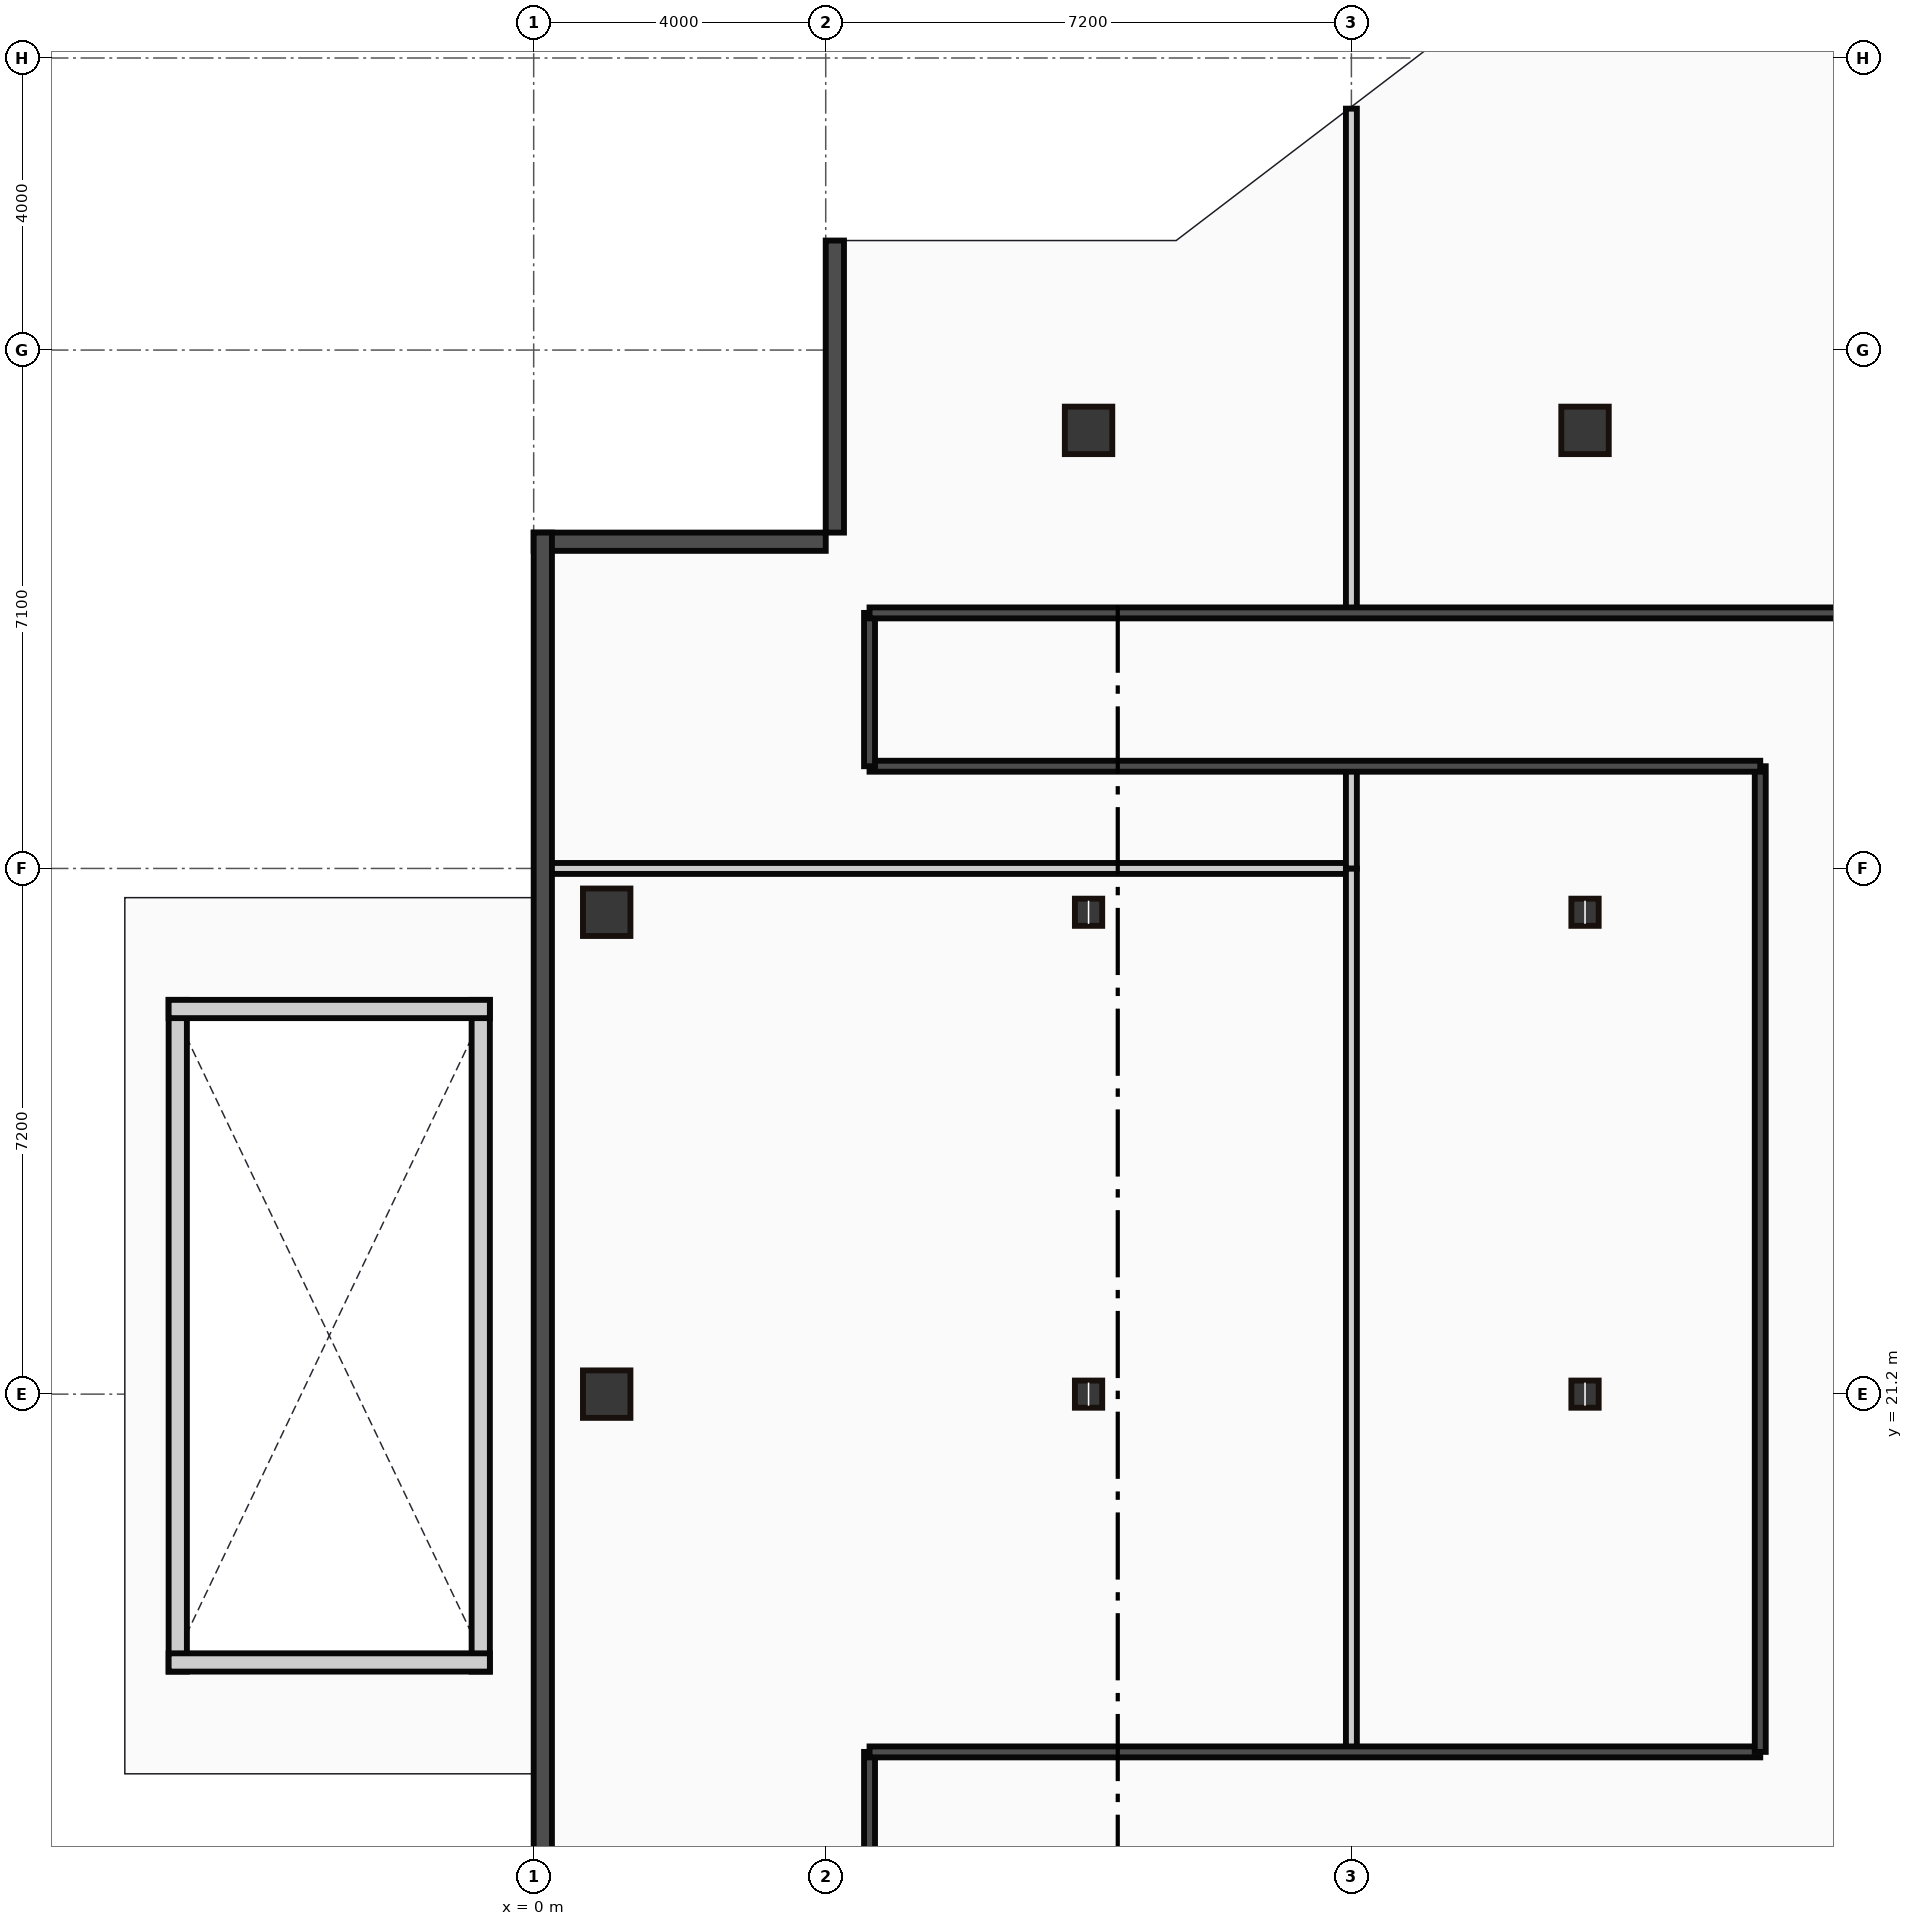
"""IFC4 building model, lengths in metres.
Left out: names, types, materials, properties, quantities, classifications, styles, units other than length and angle.
Written with IfcOpenShell. Run it as: python <this file> out.ifc"""

import sys

from ifc_helpers import new_model, si_unit, direction, frame, frame_2d, origin, origin_2d, place, context, subcontext, project, spatial, rectangle, hollow_rectangle, i_section, extrude, source, transform, mapped, element, fill, save


model = new_model("IFC4")
c1 = context("Model", 3, precision=1e-05, world=origin(), true_north=direction((0.0, 1.0)))
c2 = subcontext(c1, "Body", "Model", "MODEL_VIEW")
j1 = project(units=[si_unit("LENGTHUNIT", "METRE"), si_unit("PLANEANGLEUNIT", "RADIAN")], contexts=[c1])
p1 = place(None, origin())
s1 = spatial("IfcSite", under=j1, at=p1, CompositionType="ELEMENT")
p2 = place(p1, origin())
s2 = spatial("IfcBuilding", under=s1, at=p2, CompositionType="ELEMENT")
p3 = place(p2, frame((0.0, 0.0, 184.4)))
s3 = spatial("IfcBuildingStorey", under=s2, at=p3, CompositionType="ELEMENT", Elevation=184.4)
m1 = source(origin(), c2, "Body", "SweptSolid", [
    extrude(hollow_rectangle(XDim=0.65, YDim=0.65, WallThickness=0.032, at=origin_2d()), origin(), (0.0, 0.0, 1.0), 4.2),
])
for number, where, z_axis, x_axis in (
    (1, (1.0, 21.2, 0.0), (0.0, 0.0, 1.0), (1.0, 0.0, 0.0)),
    (2, (1.0, 27.8, 0.0), (0.0, 0.0, 1.0), (1.0, 0.0, 0.0)),
):
    element("IfcColumn", number, at=place(p3, frame(where, z_axis=z_axis, x_axis=x_axis)), inside=s3, PredefinedType="COLUMN", context=c2, shape_type="MappedRepresentation", body=[
        mapped(m1, transform((0.0, 0.0, 0.0))),
    ])
m2 = source(origin(), c2, "Body", "SweptSolid", [
    extrude(i_section(OverallWidth=0.374, OverallDepth=0.372, WebThickness=0.016, FlangeThickness=0.026, at=origin_2d()), origin(), (0.0, 0.0, 1.0), 4.2),
])
for number, where, z_axis, x_axis in (
    (3, (7.6, 21.2, 0.0), (0.0, 0.0, 1.0), (1.0, 0.0, 0.0)),
    (4, (7.6, 27.8, 0.0), (0.0, 0.0, 1.0), (1.0, 0.0, 0.0)),
):
    element("IfcColumn", number, at=place(p3, frame(where, z_axis=z_axis, x_axis=x_axis)), inside=s3, PredefinedType="COLUMN", context=c2, shape_type="MappedRepresentation", body=[
        mapped(m2, transform((0.0, 0.0, 0.0))),
    ])
p4 = place(p3, frame((7.6, 34.4, 0.0), z_axis=(0.0, 0.0, 1.0), x_axis=(1.0, 0.0, 0.0)))
e5 = element("IfcColumn", 5, at=p4, inside=s3, PredefinedType="COLUMN", context=c2, shape_type="MappedRepresentation", body=[
    mapped(m1, transform((0.0, 0.0, 0.0))),
])
for number, where, z_axis, x_axis in (
    (6, (14.4, 21.2, 0.0), (0.0, 0.0, 1.0), (1.0, 0.0, 0.0)),
    (7, (14.4, 27.8, 0.0), (0.0, 0.0, 1.0), (1.0, 0.0, 0.0)),
):
    element("IfcColumn", number, at=place(p3, frame(where, z_axis=z_axis, x_axis=x_axis)), inside=s3, PredefinedType="COLUMN", context=c2, shape_type="MappedRepresentation", body=[
        mapped(m2, transform((0.0, 0.0, 0.0))),
    ])
p5 = place(p3, frame((14.4, 34.4, 0.0), z_axis=(0.0, 0.0, 1.0), x_axis=(1.0, 0.0, 0.0)))
e8 = element("IfcColumn", 8, at=p5, inside=s3, PredefinedType="COLUMN", context=c2, shape_type="MappedRepresentation", body=[
    mapped(m1, transform((0.0, 0.0, 0.0))),
])
m3 = source(origin(), c2, "Body", "SweptSolid", [
    extrude(rectangle(XDim=4.0, YDim=0.25, at=frame_2d((2.0, 0.0))), origin(), (0.0, 0.0, 1.0), 3.95),
])
for number, where, z_axis, x_axis in (
    (9, (4.125, 37.0, 0.0), (0.0, 0.0, 1.0), (0.0, -1.0, 0.0)),
    (10, (4.0, 32.875, 0.0), (0.0, 0.0, 1.0), (-1.0, 0.0, 0.0)),
):
    element("IfcWall", number, at=place(p3, frame(where, z_axis=z_axis, x_axis=x_axis)), inside=s3, PredefinedType="STANDARD", context=c2, shape_type="MappedRepresentation", body=[
        mapped(m3, transform((0.0, 0.0, 0.0))),
    ])
m4 = source(origin(), c2, "Body", "SweptSolid", [
    extrude(rectangle(XDim=29.0, YDim=0.25, at=frame_2d((14.5, 0.0))), origin(), (0.0, 0.0, 1.0), 3.95),
])
p6 = place(p3, frame((0.125, 33.0, 0.0), z_axis=(0.0, 0.0, 1.0), x_axis=(0.0, -1.0, 0.0)))
e11 = element("IfcWall", 11, at=p6, inside=s3, PredefinedType="STANDARD", context=c2, shape_type="MappedRepresentation", body=[
    mapped(m4, transform((0.0, 0.0, 0.0))),
])
p7 = place(p6, frame((8.0, 0.0, 0.0)))
e12 = element("IfcOpeningElement", 12, at=p7, cuts=e11, PredefinedType="OPENING", context=c2, shape_type="SweptSolid", body=[
    extrude(rectangle(XDim=1.8, YDim=2.2, at=frame_2d((0.9, 1.1))), frame((0.0, 0.135, 0.0), z_axis=(0.0, -1.0, 0.0), x_axis=(1.0, 0.0, 0.0)), (0.0, 0.0, 1.0), 0.27),
])
p8 = place(p6, frame((13.0, 0.0, 0.0)))
e13 = element("IfcOpeningElement", 13, at=p8, cuts=e11, PredefinedType="OPENING", context=c2, shape_type="SweptSolid", body=[
    extrude(rectangle(XDim=1.8, YDim=2.2, at=frame_2d((0.9, 1.1))), frame((0.0, 0.135, 0.0), z_axis=(0.0, -1.0, 0.0), x_axis=(1.0, 0.0, 0.0)), (0.0, 0.0, 1.0), 0.27),
])
p9 = place(p6, frame((0.9, 0.0, 0.85)))
e14 = element("IfcOpeningElement", 14, at=p9, cuts=e11, PredefinedType="OPENING", context=c2, shape_type="SweptSolid", body=[
    extrude(rectangle(XDim=1.8, YDim=2.2, at=frame_2d((0.9, 1.1))), frame((0.0, 0.135, 0.0), z_axis=(0.0, -1.0, 0.0), x_axis=(1.0, 0.0, 0.0)), (0.0, 0.0, 1.0), 0.27),
])
p10 = place(p6, frame((22.6, 0.0, 0.85)))
e15 = element("IfcOpeningElement", 15, at=p10, cuts=e11, PredefinedType="OPENING", context=c2, shape_type="SweptSolid", body=[
    extrude(rectangle(XDim=1.8, YDim=2.2, at=frame_2d((0.9, 1.1))), frame((0.0, 0.135, 0.0), z_axis=(0.0, -1.0, 0.0), x_axis=(1.0, 0.0, 0.0)), (0.0, 0.0, 1.0), 0.27),
])
m5 = source(origin(), c2, "Body", "SweptSolid", [
    extrude(rectangle(XDim=9.2, YDim=0.25, at=frame_2d((4.6, 0.0))), origin(), (0.0, 0.0, 1.0), 1.12),
])
for number, where, z_axis, x_axis in (
    (16, (-4.875, 17.4, -1.1), (0.0, 0.0, 1.0), (0.0, 1.0, 0.0)),
    (17, (-0.725, 17.4, -1.1), (0.0, 0.0, 1.0), (0.0, 1.0, 0.0)),
):
    element("IfcWall", number, at=place(p3, frame(where, z_axis=z_axis, x_axis=x_axis)), inside=s3, PredefinedType="PARAPET", context=c2, shape_type="MappedRepresentation", body=[
        mapped(m5, transform((0.0, 0.0, 0.0))),
    ])
m6 = source(origin(), c2, "Body", "SweptSolid", [
    extrude(rectangle(XDim=4.4, YDim=0.25, at=frame_2d((2.2, 0.0))), origin(), (0.0, 0.0, 1.0), 1.12),
])
for number, where, z_axis, x_axis in (
    (18, (-5.0, 17.525, -1.1), (0.0, 0.0, 1.0), (1.0, 0.0, 0.0)),
    (19, (-5.0, 26.475, -1.1), (0.0, 0.0, 1.0), (1.0, 0.0, 0.0)),
):
    element("IfcWall", number, at=place(p3, frame(where, z_axis=z_axis, x_axis=x_axis)), inside=s3, PredefinedType="PARAPET", context=c2, shape_type="MappedRepresentation", body=[
        mapped(m6, transform((0.0, 0.0, 0.0))),
    ])
m7 = source(origin(), c2, "Body", "SweptSolid", [
    extrude(rectangle(XDim=2.22, YDim=0.15, at=frame_2d((1.11, 0.0))), origin(), (0.0, 0.0, 1.0), 3.95),
])
p11 = place(p3, frame((4.6, 14.08, 0.0), z_axis=(0.0, 0.0, 1.0), x_axis=(0.0, 1.0, 0.0)))
e20 = element("IfcWall", 20, at=p11, inside=s3, PredefinedType="PARTITIONING", context=c2, shape_type="MappedRepresentation", body=[
    mapped(m7, transform((0.0, 0.0, 0.0))),
])
m8 = source(origin(), c2, "Body", "SweptSolid", [
    extrude(rectangle(XDim=12.2, YDim=0.15, at=frame_2d((6.1, 0.0))), origin(), (0.0, 0.0, 1.0), 3.95),
])
p12 = place(p3, frame((4.6, 16.3, 0.0), z_axis=(0.0, 0.0, 1.0), x_axis=(1.0, 0.0, 0.0)))
e21 = element("IfcWall", 21, at=p12, inside=s3, PredefinedType="PARTITIONING", context=c2, shape_type="MappedRepresentation", body=[
    mapped(m8, transform((0.0, 0.0, 0.0))),
])
p13 = place(p12, frame((2.955, 0.0, 0.0)))
e22 = element("IfcOpeningElement", 22, at=p13, cuts=e21, PredefinedType="OPENING", context=c2, shape_type="SweptSolid", body=[
    extrude(rectangle(XDim=0.95, YDim=2.15, at=frame_2d((0.475, 1.075))), frame((0.0, 0.085, 0.0), z_axis=(0.0, -1.0, 0.0), x_axis=(1.0, 0.0, 0.0)), (0.0, 0.0, 1.0), 0.17),
])
m9 = source(origin(), c2, "Body", "SweptSolid", [
    extrude(rectangle(XDim=13.5, YDim=0.15, at=frame_2d((6.75, 0.0))), origin(), (0.0, 0.0, 1.0), 3.95),
])
p14 = place(p3, frame((16.8, 16.3, 0.0), z_axis=(0.0, 0.0, 1.0), x_axis=(0.0, 1.0, 0.0)))
e23 = element("IfcWall", 23, at=p14, inside=s3, PredefinedType="PARTITIONING", context=c2, shape_type="MappedRepresentation", body=[
    mapped(m9, transform((0.0, 0.0, 0.0))),
])
p15 = place(p14, frame((6.275, 0.0, 0.0)))
e24 = element("IfcOpeningElement", 24, at=p15, cuts=e23, PredefinedType="OPENING", context=c2, shape_type="SweptSolid", body=[
    extrude(rectangle(XDim=0.95, YDim=2.15, at=frame_2d((0.475, 1.075))), frame((0.0, 0.085, 0.0), z_axis=(0.0, -1.0, 0.0), x_axis=(1.0, 0.0, 0.0)), (0.0, 0.0, 1.0), 0.17),
])
p16 = place(p3, frame((16.8, 29.8, 0.0), z_axis=(0.0, 0.0, 1.0), x_axis=(-1.0, 0.0, 0.0)))
e25 = element("IfcWall", 25, at=p16, inside=s3, PredefinedType="PARTITIONING", context=c2, shape_type="MappedRepresentation", body=[
    mapped(m8, transform((0.0, 0.0, 0.0))),
])
m10 = source(origin(), c2, "Body", "SweptSolid", [
    extrude(rectangle(XDim=2.1, YDim=0.15, at=frame_2d((1.05, 0.0))), origin(), (0.0, 0.0, 1.0), 3.95),
])
p17 = place(p3, frame((4.6, 29.8, 0.0), z_axis=(0.0, 0.0, 1.0), x_axis=(0.0, 1.0, 0.0)))
e26 = element("IfcWall", 26, at=p17, inside=s3, PredefinedType="PARTITIONING", context=c2, shape_type="MappedRepresentation", body=[
    mapped(m10, transform((0.0, 0.0, 0.0))),
])
m11 = source(origin(), c2, "Body", "SweptSolid", [
    extrude(rectangle(XDim=14.45, YDim=0.15, at=frame_2d((7.225, 0.0))), origin(), (0.0, 0.0, 1.0), 3.95),
])
p18 = place(p3, frame((4.6, 31.9, 0.0), z_axis=(0.0, 0.0, 1.0), x_axis=(1.0, 0.0, 0.0)))
e27 = element("IfcWall", 27, at=p18, inside=s3, PredefinedType="PARTITIONING", context=c2, shape_type="MappedRepresentation", body=[
    mapped(m11, transform((0.0, 0.0, 0.0))),
])
p19 = place(p18, frame((2.955, 0.0, 0.0)))
e28 = element("IfcOpeningElement", 28, at=p19, cuts=e27, PredefinedType="OPENING", context=c2, shape_type="SweptSolid", body=[
    extrude(rectangle(XDim=0.95, YDim=2.15, at=frame_2d((0.475, 1.075))), frame((0.0, 0.085, 0.0), z_axis=(0.0, -1.0, 0.0), x_axis=(1.0, 0.0, 0.0)), (0.0, 0.0, 1.0), 0.17),
])
p20 = place(p18, frame((9.92, 0.0, 0.0)))
e29 = element("IfcOpeningElement", 29, at=p20, cuts=e27, PredefinedType="OPENING", context=c2, shape_type="SweptSolid", body=[
    extrude(rectangle(XDim=0.95, YDim=2.15, at=frame_2d((0.475, 1.075))), frame((0.0, 0.085, 0.0), z_axis=(0.0, -1.0, 0.0), x_axis=(1.0, 0.0, 0.0)), (0.0, 0.0, 1.0), 0.17),
])
m12 = source(origin(), c2, "Body", "SweptSolid", [
    extrude(rectangle(XDim=11.18, YDim=0.15, at=frame_2d((5.59, 0.0))), origin(), (0.0, 0.0, 1.0), 3.95),
])
p21 = place(p3, frame((0.02, 28.4, 0.0), z_axis=(0.0, 0.0, 1.0), x_axis=(1.0, 0.0, 0.0)))
e30 = element("IfcWall", 30, at=p21, inside=s3, PredefinedType="PARTITIONING", context=c2, shape_type="MappedRepresentation", body=[
    mapped(m12, transform((0.0, 0.0, 0.0))),
])
m13 = source(origin(), c2, "Body", "SweptSolid", [
    extrude(rectangle(XDim=12.1, YDim=0.15, at=frame_2d((6.05, 0.0))), origin(), (0.0, 0.0, 1.0), 3.95),
])
p22 = place(p3, frame((11.2, 28.4, 0.0), z_axis=(0.0, 0.0, 1.0), x_axis=(0.0, -1.0, 0.0)))
e31 = element("IfcWall", 31, at=p22, inside=s3, PredefinedType="PARTITIONING", context=c2, shape_type="MappedRepresentation", body=[
    mapped(m13, transform((0.0, 0.0, 0.0))),
])
m14 = source(origin(), c2, "Body", "SweptSolid", [
    extrude(rectangle(XDim=1.4, YDim=0.15, at=frame_2d((0.7, 0.0))), origin(), (0.0, 0.0, 1.0), 3.95),
])
p23 = place(p3, frame((11.2, 29.8, 0.0), z_axis=(0.0, 0.0, 1.0), x_axis=(0.0, -1.0, 0.0)))
e32 = element("IfcWall", 32, at=p23, inside=s3, PredefinedType="PARTITIONING", context=c2, shape_type="MappedRepresentation", body=[
    mapped(m14, transform((0.0, 0.0, 0.0))),
])
m15 = source(origin(), c2, "Body", "SweptSolid", [
    extrude(rectangle(XDim=6.906, YDim=0.15, at=frame_2d((3.453, 0.0))), origin(), (0.0, 0.0, 1.0), 3.95),
])
p24 = place(p3, frame((11.2, 38.806, 0.0), z_axis=(0.0, 0.0, 1.0), x_axis=(0.0, -1.0, 0.0)))
e33 = element("IfcWall", 33, at=p24, inside=s3, PredefinedType="PARTITIONING", context=c2, shape_type="MappedRepresentation", body=[
    mapped(m15, transform((0.0, 0.0, 0.0))),
])
m16 = source(origin(), c2, "Body", "SweptSolid", [
    extrude(rectangle(XDim=1.8, YDim=2.2, at=frame_2d((0.9, 1.1))), frame((0.0, 0.025, 0.0), z_axis=(0.0, -1.0, 0.0), x_axis=(1.0, 0.0, 0.0)), (0.0, 0.0, 1.0), 0.05),
])
p25 = place(p7, frame((1.8, 0.0, 0.0), z_axis=(0.0, 0.0, 1.0), x_axis=(-1.0, 0.0, 0.0)))
e34 = element("IfcDoor", 34, at=p25, inside=s3, OperationType="DOUBLE_DOOR_SINGLE_SWING", PredefinedType="DOOR", context=c2, shape_type="MappedRepresentation", body=[
    mapped(m16, transform((0.0, 0.0, 0.0))),
])
fill(e12, e34)
p26 = place(p8, frame((1.8, 0.0, 0.0), z_axis=(0.0, 0.0, 1.0), x_axis=(-1.0, 0.0, 0.0)))
e35 = element("IfcDoor", 35, at=p26, inside=s3, OperationType="DOUBLE_DOOR_SINGLE_SWING", PredefinedType="DOOR", context=c2, shape_type="MappedRepresentation", body=[
    mapped(m16, transform((0.0, 0.0, 0.0))),
])
fill(e13, e35)
m17 = source(origin(), c2, "Body", "SweptSolid", [
    extrude(rectangle(XDim=1.8, YDim=2.2, at=frame_2d((0.9, 1.1))), frame((0.0, 0.03, 0.0), z_axis=(0.0, -1.0, 0.0), x_axis=(1.0, 0.0, 0.0)), (0.0, 0.0, 1.0), 0.06),
])
p27 = place(p9, origin())
e36 = element("IfcWindow", 36, at=p27, inside=s3, PartitioningType="SINGLE_PANEL", PredefinedType="WINDOW", context=c2, shape_type="MappedRepresentation", body=[
    mapped(m17, transform((0.0, 0.0, 0.0))),
])
fill(e14, e36)
m18 = source(origin(), c2, "Body", "SweptSolid", [
    extrude(rectangle(XDim=0.95, YDim=2.15, at=frame_2d((0.475, 1.075))), frame((0.0, 0.025, 0.0), z_axis=(0.0, -1.0, 0.0), x_axis=(1.0, 0.0, 0.0)), (0.0, 0.0, 1.0), 0.05),
])
p28 = place(p13, origin())
e37 = element("IfcDoor", 37, at=p28, inside=s3, OperationType="SINGLE_SWING_LEFT", PredefinedType="DOOR", context=c2, shape_type="MappedRepresentation", body=[
    mapped(m18, transform((0.0, 0.0, 0.0))),
])
fill(e22, e37)
p29 = place(p19, origin())
e38 = element("IfcDoor", 38, at=p29, inside=s3, OperationType="SINGLE_SWING_RIGHT", PredefinedType="DOOR", context=c2, shape_type="MappedRepresentation", body=[
    mapped(m18, transform((0.0, 0.0, 0.0))),
])
fill(e28, e38)
p30 = place(p15, origin())
e39 = element("IfcDoor", 39, at=p30, inside=s3, OperationType="SINGLE_SWING_LEFT", PredefinedType="DOOR", context=c2, shape_type="MappedRepresentation", body=[
    mapped(m18, transform((0.0, 0.0, 0.0))),
])
fill(e24, e39)
p31 = place(p20, origin())
e40 = element("IfcDoor", 40, at=p31, inside=s3, OperationType="SINGLE_SWING_LEFT", PredefinedType="DOOR", context=c2, shape_type="MappedRepresentation", body=[
    mapped(m18, transform((0.0, 0.0, 0.0))),
])
fill(e29, e40)
save(model, sys.argv[1])
